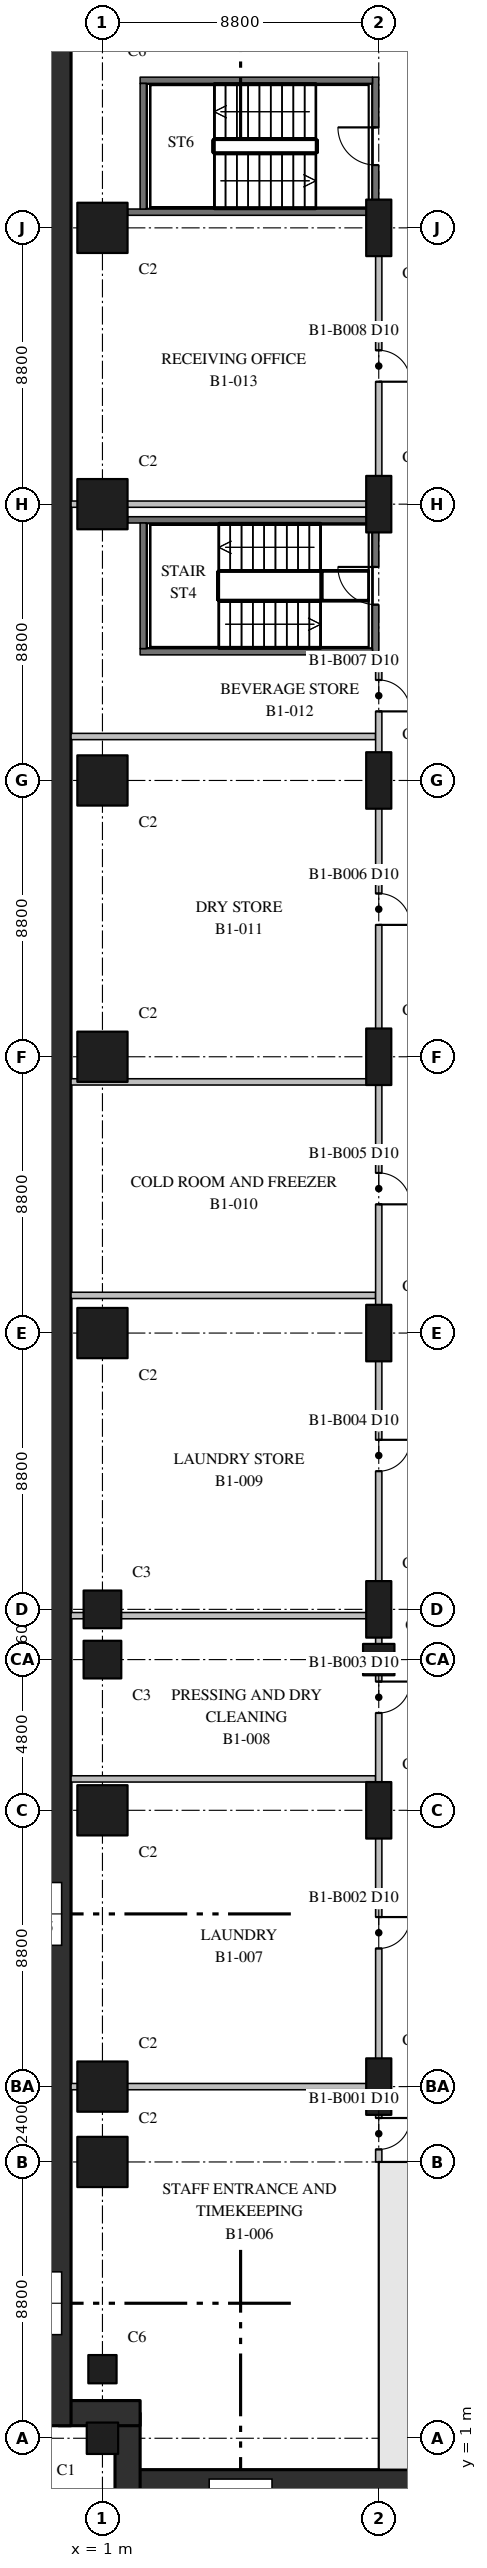
"""IFC4 building model, lengths in metres.
Left out: names, types, materials, properties, quantities, classifications, styles, units other than length and angle.
Written with IfcOpenShell. Run it as: python <this file> out.ifc"""

import sys

from ifc_helpers import new_model, si_unit, direction, frame, frame_2d, origin, origin_2d, place, context, subcontext, project, spatial, rectangle, extrude, element, fill, save


model = new_model("IFC4")
c1 = context("Model", 3, precision=1e-05, world=origin(), true_north=direction((0.0, 1.0)))
c2 = subcontext(c1, "Body", "Model", "MODEL_VIEW")
j1 = project(units=[si_unit("LENGTHUNIT", "METRE"), si_unit("PLANEANGLEUNIT", "RADIAN")], contexts=[c1])
p1 = place(None, origin())
s1 = spatial("IfcSite", under=j1, at=p1, CompositionType="ELEMENT")
p2 = place(p1, origin())
s2 = spatial("IfcBuilding", under=s1, at=p2, CompositionType="ELEMENT")
p3 = place(p2, frame((0.0, 0.0, -7.0)))
s3 = spatial("IfcBuildingStorey", under=s2, at=p3, CompositionType="ELEMENT", Elevation=-7.0)
p4 = place(p3, frame((1.0, 1.0, 0.0), z_axis=(0.0, 0.0, 1.0), x_axis=(1.0, 0.0, 0.0)))
e1 = element("IfcColumn", 1, at=p4, inside=s3, PredefinedType="COLUMN", context=c2, shape_type="SweptSolid", body=[
    extrude(rectangle(XDim=1.0, YDim=1.0, at=origin_2d()), origin(), (0.0, 0.0, 1.0), 7.0),
])
for number, where, z_axis, x_axis in (
    (2, (1.0, 9.8, 0.0), (0.0, 0.0, 1.0), (1.0, 0.0, 0.0)),
    (3, (1.0, 12.2, 0.0), (0.0, 0.0, 1.0), (1.0, 0.0, 0.0)),
    (4, (1.0, 21.0, 0.0), (0.0, 0.0, 1.0), (1.0, 0.0, 0.0)),
):
    element("IfcColumn", number, at=place(p3, frame(where, z_axis=z_axis, x_axis=x_axis)), inside=s3, PredefinedType="COLUMN", context=c2, shape_type="SweptSolid", body=[
        extrude(rectangle(XDim=1.6, YDim=1.6, at=origin_2d()), origin(), (0.0, 0.0, 1.0), 7.0),
    ])
for number, where, z_axis, x_axis in (
    (5, (1.0, 25.8, 0.0), (0.0, 0.0, 1.0), (1.0, 0.0, 0.0)),
    (6, (1.0, 27.4, 0.0), (0.0, 0.0, 1.0), (1.0, 0.0, 0.0)),
):
    element("IfcColumn", number, at=place(p3, frame(where, z_axis=z_axis, x_axis=x_axis)), inside=s3, PredefinedType="COLUMN", context=c2, shape_type="SweptSolid", body=[
        extrude(rectangle(XDim=1.2, YDim=1.2, at=origin_2d()), origin(), (0.0, 0.0, 1.0), 7.0),
    ])
for number, where, z_axis, x_axis in (
    (7, (1.0, 36.2, 0.0), (0.0, 0.0, 1.0), (1.0, 0.0, 0.0)),
    (8, (1.0, 45.0, 0.0), (0.0, 0.0, 1.0), (1.0, 0.0, 0.0)),
    (9, (1.0, 53.8, 0.0), (0.0, 0.0, 1.0), (1.0, 0.0, 0.0)),
    (10, (1.0, 62.6, 0.0), (0.0, 0.0, 1.0), (1.0, 0.0, 0.0)),
    (11, (1.0, 71.4, 0.0), (0.0, 0.0, 1.0), (1.0, 0.0, 0.0)),
):
    element("IfcColumn", number, at=place(p3, frame(where, z_axis=z_axis, x_axis=x_axis)), inside=s3, PredefinedType="COLUMN", context=c2, shape_type="SweptSolid", body=[
        extrude(rectangle(XDim=1.6, YDim=1.6, at=origin_2d()), origin(), (0.0, 0.0, 1.0), 7.0),
    ])
for number, where, z_axis, x_axis in (
    (12, (9.8, 12.2, 0.0), (0.0, 0.0, 1.0), (0.0, 1.0, 0.0)),
    (13, (9.8, 21.0, 0.0), (0.0, 0.0, 1.0), (0.0, 1.0, 0.0)),
):
    element("IfcColumn", number, at=place(p3, frame(where, z_axis=z_axis, x_axis=x_axis)), inside=s3, PredefinedType="COLUMN", context=c2, shape_type="SweptSolid", body=[
        extrude(rectangle(XDim=1.8, YDim=0.8, at=origin_2d()), origin(), (0.0, 0.0, 1.0), 7.0),
    ])
p5 = place(p3, frame((9.8, 25.8, 0.0), z_axis=(0.0, 0.0, 1.0), x_axis=(1.0, 0.0, 0.0)))
e14 = element("IfcColumn", 14, at=p5, inside=s3, PredefinedType="COLUMN", context=c2, shape_type="SweptSolid", body=[
    extrude(rectangle(XDim=1.0, YDim=1.0, at=origin_2d()), origin(), (0.0, 0.0, 1.0), 7.0),
])
for number, where, z_axis, x_axis in (
    (15, (9.8, 27.4, 0.0), (0.0, 0.0, 1.0), (0.0, 1.0, 0.0)),
    (16, (9.8, 36.2, 0.0), (0.0, 0.0, 1.0), (0.0, 1.0, 0.0)),
    (17, (9.8, 45.0, 0.0), (0.0, 0.0, 1.0), (0.0, 1.0, 0.0)),
    (18, (9.8, 53.8, 0.0), (0.0, 0.0, 1.0), (0.0, 1.0, 0.0)),
    (19, (9.8, 62.6, 0.0), (0.0, 0.0, 1.0), (0.0, 1.0, 0.0)),
    (20, (9.8, 71.4, 0.0), (0.0, 0.0, 1.0), (0.0, 1.0, 0.0)),
):
    element("IfcColumn", number, at=place(p3, frame(where, z_axis=z_axis, x_axis=x_axis)), inside=s3, PredefinedType="COLUMN", context=c2, shape_type="SweptSolid", body=[
        extrude(rectangle(XDim=1.8, YDim=0.8, at=origin_2d()), origin(), (0.0, 0.0, 1.0), 7.0),
    ])
p6 = place(p3, frame((1.0, 3.2, 0.0), z_axis=(0.0, 0.0, 1.0), x_axis=(1.0, 0.0, 0.0)))
e21 = element("IfcColumn", 21, at=p6, inside=s3, PredefinedType="COLUMN", context=c2, shape_type="SweptSolid", body=[
    extrude(rectangle(XDim=0.9, YDim=0.9, at=origin_2d()), origin(), (0.0, 0.0, 1.0), 7.0),
])
p7 = place(p3, frame((9.8, 0.6, 0.0), z_axis=(0.0, 0.0, 1.0), x_axis=(1.0, 0.0, 0.0)))
e22 = element("IfcWall", 22, at=p7, inside=s3, PredefinedType="SHEAR", context=c2, shape_type="SweptSolid", body=[
    extrude(rectangle(XDim=35.2, YDim=1.2, at=frame_2d((17.6, 0.0))), origin(), (0.0, 0.0, 1.0), 7.0),
])
p8 = place(p3, frame((10.4, 1.2, 0.0), z_axis=(0.0, 0.0, 1.0), x_axis=(0.0, 1.0, 0.0)))
e23 = element("IfcWall", 23, at=p8, inside=s3, PredefinedType="SHEAR", context=c2, shape_type="SweptSolid", body=[
    extrude(rectangle(XDim=8.6, YDim=1.2, at=frame_2d((4.3, 0.0))), origin(), (0.0, 0.0, 1.0), 7.0),
])
p9 = place(p3, frame((9.8, 9.6, 0.0), z_axis=(0.0, 0.0, 1.0), x_axis=(1.0, 0.0, 0.0)))
e24 = element("IfcWall", 24, at=p9, inside=s3, PredefinedType="SHEAR", context=c2, shape_type="SweptSolid", body=[
    extrude(rectangle(XDim=4.3, YDim=0.4, at=frame_2d((2.15, 0.0))), origin(), (0.0, 0.0, 1.0), 7.0),
])
p10 = place(p9, frame((2.05, 0.0, 0.0)))
e25 = element("IfcOpeningElement", 25, at=p10, cuts=e24, PredefinedType="OPENING", context=c2, shape_type="SweptSolid", body=[
    extrude(rectangle(XDim=1.2, YDim=2.1, at=frame_2d((0.6, 1.05))), frame((0.0, 0.21, 0.0), z_axis=(0.0, -1.0, 0.0), x_axis=(1.0, 0.0, 0.0)), (0.0, 0.0, 1.0), 0.42),
])
p11 = place(p3, frame((79.8, -0.4, 0.0), z_axis=(0.0, 0.0, 1.0), x_axis=(-1.0, 0.0, 0.0)))
e26 = element("IfcWall", 26, at=p11, inside=s3, PredefinedType="SHEAR", context=c2, shape_type="SweptSolid", body=[
    extrude(rectangle(XDim=78.0, YDim=0.8, at=frame_2d((39.0, 0.0))), origin(), (0.0, 0.0, 1.0), 7.0),
])
p12 = place(p3, frame((1.8, -0.8, 0.0), z_axis=(0.0, 0.0, 1.0), x_axis=(0.0, 1.0, 0.0)))
e27 = element("IfcWall", 27, at=p12, inside=s3, PredefinedType="SHEAR", context=c2, shape_type="SweptSolid", body=[
    extrude(rectangle(XDim=2.6, YDim=0.8, at=frame_2d((1.3, 0.0))), origin(), (0.0, 0.0, 1.0), 7.0),
])
p13 = place(p3, frame((2.2, 1.8, 0.0), z_axis=(0.0, 0.0, 1.0), x_axis=(-1.0, 0.0, 0.0)))
e28 = element("IfcWall", 28, at=p13, inside=s3, PredefinedType="SHEAR", context=c2, shape_type="SweptSolid", body=[
    extrude(rectangle(XDim=2.6, YDim=0.8, at=frame_2d((1.3, 0.0))), origin(), (0.0, 0.0, 1.0), 7.0),
])
p14 = place(p3, frame((-0.4, 1.4, 0.0), z_axis=(0.0, 0.0, 1.0), x_axis=(0.0, 1.0, 0.0)))
e29 = element("IfcWall", 29, at=p14, inside=s3, PredefinedType="SHEAR", context=c2, shape_type="SweptSolid", body=[
    extrude(rectangle(XDim=78.0, YDim=0.8, at=frame_2d((39.0, 0.0))), origin(), (0.0, 0.0, 1.0), 7.0),
])
p15 = place(p3, frame((9.7, 57.8, 0.0), z_axis=(0.0, 0.0, 1.0), x_axis=(0.0, 1.0, 0.0)))
e30 = element("IfcWall", 30, at=p15, inside=s3, PredefinedType="SHEAR", context=c2, shape_type="SweptSolid", body=[
    extrude(rectangle(XDim=4.4, YDim=0.2, at=frame_2d((2.2, 0.0))), origin(), (0.0, 0.0, 1.0), 6.55),
])
p16 = place(p15, frame((1.6, 0.0, 0.0)))
e31 = element("IfcOpeningElement", 31, at=p16, cuts=e30, PredefinedType="OPENING", context=c2, shape_type="SweptSolid", body=[
    extrude(rectangle(XDim=1.2, YDim=2.1, at=frame_2d((0.6, 1.05))), frame((0.0, 0.11, 0.0), z_axis=(0.0, -1.0, 0.0), x_axis=(1.0, 0.0, 0.0)), (0.0, 0.0, 1.0), 0.22),
])
p17 = place(p3, frame((1.8, 62.1, 0.0), z_axis=(0.0, 0.0, 1.0), x_axis=(1.0, 0.0, 0.0)))
e32 = element("IfcWall", 32, at=p17, inside=s3, PredefinedType="SHEAR", context=c2, shape_type="SweptSolid", body=[
    extrude(rectangle(XDim=7.8, YDim=0.2, at=frame_2d((3.9, 0.0))), origin(), (0.0, 0.0, 1.0), 6.55),
])
p18 = place(p3, frame((2.2, 57.9, 0.0), z_axis=(0.0, 0.0, 1.0), x_axis=(1.0, 0.0, 0.0)))
e33 = element("IfcWall", 33, at=p18, inside=s3, PredefinedType="SHEAR", context=c2, shape_type="SweptSolid", body=[
    extrude(rectangle(XDim=7.4, YDim=0.2, at=frame_2d((3.7, 0.0))), origin(), (0.0, 0.0, 1.0), 6.55),
])
p19 = place(p3, frame((2.3, 58.0, 0.0), z_axis=(0.0, 0.0, 1.0), x_axis=(0.0, 1.0, 0.0)))
e34 = element("IfcWall", 34, at=p19, inside=s3, PredefinedType="SHEAR", context=c2, shape_type="SweptSolid", body=[
    extrude(rectangle(XDim=4.0, YDim=0.2, at=frame_2d((2.0, 0.0))), origin(), (0.0, 0.0, 1.0), 6.55),
])
p20 = place(p3, frame((9.7, 71.8, 0.0), z_axis=(0.0, 0.0, 1.0), x_axis=(0.0, 1.0, 0.0)))
e35 = element("IfcWall", 35, at=p20, inside=s3, PredefinedType="SHEAR", context=c2, shape_type="SweptSolid", body=[
    extrude(rectangle(XDim=4.4, YDim=0.2, at=frame_2d((2.2, 0.0))), origin(), (0.0, 0.0, 1.0), 6.55),
])
p21 = place(p20, frame((1.6, 0.0, 0.0)))
e36 = element("IfcOpeningElement", 36, at=p21, cuts=e35, PredefinedType="OPENING", context=c2, shape_type="SweptSolid", body=[
    extrude(rectangle(XDim=1.2, YDim=2.1, at=frame_2d((0.6, 1.05))), frame((0.0, 0.11, 0.0), z_axis=(0.0, -1.0, 0.0), x_axis=(1.0, 0.0, 0.0)), (0.0, 0.0, 1.0), 0.22),
])
p22 = place(p3, frame((2.2, 76.1, 0.0), z_axis=(0.0, 0.0, 1.0), x_axis=(1.0, 0.0, 0.0)))
e37 = element("IfcWall", 37, at=p22, inside=s3, PredefinedType="SHEAR", context=c2, shape_type="SweptSolid", body=[
    extrude(rectangle(XDim=7.4, YDim=0.2, at=frame_2d((3.7, 0.0))), origin(), (0.0, 0.0, 1.0), 6.55),
])
p23 = place(p3, frame((1.8, 71.9, 0.0), z_axis=(0.0, 0.0, 1.0), x_axis=(1.0, 0.0, 0.0)))
e38 = element("IfcWall", 38, at=p23, inside=s3, PredefinedType="SHEAR", context=c2, shape_type="SweptSolid", body=[
    extrude(rectangle(XDim=7.8, YDim=0.2, at=frame_2d((3.9, 0.0))), origin(), (0.0, 0.0, 1.0), 6.55),
])
p24 = place(p3, frame((2.3, 72.0, 0.0), z_axis=(0.0, 0.0, 1.0), x_axis=(0.0, 1.0, 0.0)))
e39 = element("IfcWall", 39, at=p24, inside=s3, PredefinedType="SHEAR", context=c2, shape_type="SweptSolid", body=[
    extrude(rectangle(XDim=4.0, YDim=0.2, at=frame_2d((2.0, 0.0))), origin(), (0.0, 0.0, 1.0), 6.55),
])
for number, where, z_axis, x_axis in (
    (40, (0.0, 12.2, 0.0), (0.0, 0.0, 1.0), (1.0, 0.0, 0.0)),
    (41, (0.0, 22.0, 0.0), (0.0, 0.0, 1.0), (1.0, 0.0, 0.0)),
    (42, (0.0, 27.2, 0.0), (0.0, 0.0, 1.0), (1.0, 0.0, 0.0)),
    (43, (0.0, 37.4, 0.0), (0.0, 0.0, 1.0), (1.0, 0.0, 0.0)),
    (44, (0.0, 44.2, 0.0), (0.0, 0.0, 1.0), (1.0, 0.0, 0.0)),
    (45, (0.0, 55.2, 0.0), (0.0, 0.0, 1.0), (1.0, 0.0, 0.0)),
    (46, (0.0, 62.6, 0.0), (0.0, 0.0, 1.0), (1.0, 0.0, 0.0)),
):
    element("IfcWall", number, at=place(p3, frame(where, z_axis=z_axis, x_axis=x_axis)), inside=s3, PredefinedType="PARTITIONING", context=c2, shape_type="SweptSolid", body=[
        extrude(rectangle(XDim=9.7, YDim=0.2, at=frame_2d((4.85, 0.0))), origin(), (0.0, 0.0, 1.0), 6.5),
    ])
p25 = place(p3, frame((9.8, 9.8, 0.0), z_axis=(0.0, 0.0, 1.0), x_axis=(0.0, 1.0, 0.0)))
e47 = element("IfcWall", 47, at=p25, inside=s3, PredefinedType="PARTITIONING", context=c2, shape_type="SweptSolid", body=[
    extrude(rectangle(XDim=48.0, YDim=0.2, at=frame_2d((24.0, 0.0))), origin(), (0.0, 0.0, 1.0), 6.5),
])
p26 = place(p25, frame((0.4, 0.0, 0.0)))
e48 = element("IfcOpeningElement", 48, at=p26, cuts=e47, PredefinedType="OPENING", context=c2, shape_type="SweptSolid", body=[
    extrude(rectangle(XDim=1.0, YDim=2.1, at=frame_2d((0.5, 1.05))), frame((0.0, 0.11, 0.0), z_axis=(0.0, -1.0, 0.0), x_axis=(1.0, 0.0, 0.0)), (0.0, 0.0, 1.0), 0.22),
])
p27 = place(p25, frame((6.8, 0.0, 0.0)))
e49 = element("IfcOpeningElement", 49, at=p27, cuts=e47, PredefinedType="OPENING", context=c2, shape_type="SweptSolid", body=[
    extrude(rectangle(XDim=1.0, YDim=2.1, at=frame_2d((0.5, 1.05))), frame((0.0, 0.11, 0.0), z_axis=(0.0, -1.0, 0.0), x_axis=(1.0, 0.0, 0.0)), (0.0, 0.0, 1.0), 0.22),
])
p28 = place(p25, frame((14.3, 0.0, 0.0)))
e50 = element("IfcOpeningElement", 50, at=p28, cuts=e47, PredefinedType="OPENING", context=c2, shape_type="SweptSolid", body=[
    extrude(rectangle(XDim=1.0, YDim=2.1, at=frame_2d((0.5, 1.05))), frame((0.0, 0.11, 0.0), z_axis=(0.0, -1.0, 0.0), x_axis=(1.0, 0.0, 0.0)), (0.0, 0.0, 1.0), 0.22),
])
p29 = place(p25, frame((22.0, 0.0, 0.0)))
e51 = element("IfcOpeningElement", 51, at=p29, cuts=e47, PredefinedType="OPENING", context=c2, shape_type="SweptSolid", body=[
    extrude(rectangle(XDim=1.0, YDim=2.1, at=frame_2d((0.5, 1.05))), frame((0.0, 0.11, 0.0), z_axis=(0.0, -1.0, 0.0), x_axis=(1.0, 0.0, 0.0)), (0.0, 0.0, 1.0), 0.22),
])
p30 = place(p25, frame((30.5, 0.0, 0.0)))
e52 = element("IfcOpeningElement", 52, at=p30, cuts=e47, PredefinedType="OPENING", context=c2, shape_type="SweptSolid", body=[
    extrude(rectangle(XDim=1.0, YDim=2.1, at=frame_2d((0.5, 1.05))), frame((0.0, 0.11, 0.0), z_axis=(0.0, -1.0, 0.0), x_axis=(1.0, 0.0, 0.0)), (0.0, 0.0, 1.0), 0.22),
])
p31 = place(p25, frame((39.4, 0.0, 0.0)))
e53 = element("IfcOpeningElement", 53, at=p31, cuts=e47, PredefinedType="OPENING", context=c2, shape_type="SweptSolid", body=[
    extrude(rectangle(XDim=1.0, YDim=2.1, at=frame_2d((0.5, 1.05))), frame((0.0, 0.11, 0.0), z_axis=(0.0, -1.0, 0.0), x_axis=(1.0, 0.0, 0.0)), (0.0, 0.0, 1.0), 0.22),
])
p32 = place(p25, frame((46.2, 0.0, 0.0)))
e54 = element("IfcOpeningElement", 54, at=p32, cuts=e47, PredefinedType="OPENING", context=c2, shape_type="SweptSolid", body=[
    extrude(rectangle(XDim=1.0, YDim=2.1, at=frame_2d((0.5, 1.05))), frame((0.0, 0.11, 0.0), z_axis=(0.0, -1.0, 0.0), x_axis=(1.0, 0.0, 0.0)), (0.0, 0.0, 1.0), 0.22),
])
p33 = place(p3, frame((9.8, 62.2, 0.0), z_axis=(0.0, 0.0, 1.0), x_axis=(0.0, 1.0, 0.0)))
e55 = element("IfcWall", 55, at=p33, inside=s3, PredefinedType="PARTITIONING", context=c2, shape_type="SweptSolid", body=[
    extrude(rectangle(XDim=9.2, YDim=0.2, at=frame_2d((4.6, 0.0))), origin(), (0.0, 0.0, 1.0), 6.5),
])
p34 = place(p33, frame((4.3, 0.0, 0.0)))
e56 = element("IfcOpeningElement", 56, at=p34, cuts=e55, PredefinedType="OPENING", context=c2, shape_type="SweptSolid", body=[
    extrude(rectangle(XDim=1.0, YDim=2.1, at=frame_2d((0.5, 1.05))), frame((0.0, 0.11, 0.0), z_axis=(0.0, -1.0, 0.0), x_axis=(1.0, 0.0, 0.0)), (0.0, 0.0, 1.0), 0.22),
])
p35 = place(p16, origin())
e57 = element("IfcDoor", 57, at=p35, inside=s3, OperationType="SINGLE_SWING_RIGHT", PredefinedType="DOOR", context=c2, shape_type="SweptSolid", body=[
    extrude(rectangle(XDim=1.2, YDim=2.1, at=frame_2d((0.6, 1.05))), frame((0.0, 0.025, 0.0), z_axis=(0.0, -1.0, 0.0), x_axis=(1.0, 0.0, 0.0)), (0.0, 0.0, 1.0), 0.05),
])
fill(e31, e57)
p36 = place(p21, origin())
e58 = element("IfcDoor", 58, at=p36, inside=s3, OperationType="SINGLE_SWING_RIGHT", PredefinedType="DOOR", context=c2, shape_type="SweptSolid", body=[
    extrude(rectangle(XDim=1.2, YDim=2.1, at=frame_2d((0.6, 1.05))), frame((0.0, 0.025, 0.0), z_axis=(0.0, -1.0, 0.0), x_axis=(1.0, 0.0, 0.0)), (0.0, 0.0, 1.0), 0.05),
])
fill(e36, e58)
p37 = place(p26, frame((1.0, 0.0, 0.0), z_axis=(0.0, 0.0, 1.0), x_axis=(-1.0, 0.0, 0.0)))
e59 = element("IfcDoor", 59, at=p37, inside=s3, OperationType="SINGLE_SWING_RIGHT", PredefinedType="DOOR", context=c2, shape_type="SweptSolid", body=[
    extrude(rectangle(XDim=1.0, YDim=2.1, at=frame_2d((0.5, 1.05))), frame((0.0, 0.025, 0.0), z_axis=(0.0, -1.0, 0.0), x_axis=(1.0, 0.0, 0.0)), (0.0, 0.0, 1.0), 0.05),
])
fill(e48, e59)
p38 = place(p27, frame((1.0, 0.0, 0.0), z_axis=(0.0, 0.0, 1.0), x_axis=(-1.0, 0.0, 0.0)))
e60 = element("IfcDoor", 60, at=p38, inside=s3, OperationType="SINGLE_SWING_RIGHT", PredefinedType="DOOR", context=c2, shape_type="SweptSolid", body=[
    extrude(rectangle(XDim=1.0, YDim=2.1, at=frame_2d((0.5, 1.05))), frame((0.0, 0.025, 0.0), z_axis=(0.0, -1.0, 0.0), x_axis=(1.0, 0.0, 0.0)), (0.0, 0.0, 1.0), 0.05),
])
fill(e49, e60)
p39 = place(p28, frame((1.0, 0.0, 0.0), z_axis=(0.0, 0.0, 1.0), x_axis=(-1.0, 0.0, 0.0)))
e61 = element("IfcDoor", 61, at=p39, inside=s3, OperationType="SINGLE_SWING_RIGHT", PredefinedType="DOOR", context=c2, shape_type="SweptSolid", body=[
    extrude(rectangle(XDim=1.0, YDim=2.1, at=frame_2d((0.5, 1.05))), frame((0.0, 0.025, 0.0), z_axis=(0.0, -1.0, 0.0), x_axis=(1.0, 0.0, 0.0)), (0.0, 0.0, 1.0), 0.05),
])
fill(e50, e61)
p40 = place(p29, frame((1.0, 0.0, 0.0), z_axis=(0.0, 0.0, 1.0), x_axis=(-1.0, 0.0, 0.0)))
e62 = element("IfcDoor", 62, at=p40, inside=s3, OperationType="SINGLE_SWING_RIGHT", PredefinedType="DOOR", context=c2, shape_type="SweptSolid", body=[
    extrude(rectangle(XDim=1.0, YDim=2.1, at=frame_2d((0.5, 1.05))), frame((0.0, 0.025, 0.0), z_axis=(0.0, -1.0, 0.0), x_axis=(1.0, 0.0, 0.0)), (0.0, 0.0, 1.0), 0.05),
])
fill(e51, e62)
p41 = place(p30, frame((1.0, 0.0, 0.0), z_axis=(0.0, 0.0, 1.0), x_axis=(-1.0, 0.0, 0.0)))
e63 = element("IfcDoor", 63, at=p41, inside=s3, OperationType="SINGLE_SWING_LEFT", PredefinedType="DOOR", context=c2, shape_type="SweptSolid", body=[
    extrude(rectangle(XDim=1.0, YDim=2.1, at=frame_2d((0.5, 1.05))), frame((0.0, 0.025, 0.0), z_axis=(0.0, -1.0, 0.0), x_axis=(1.0, 0.0, 0.0)), (0.0, 0.0, 1.0), 0.05),
])
fill(e52, e63)
p42 = place(p31, frame((1.0, 0.0, 0.0), z_axis=(0.0, 0.0, 1.0), x_axis=(-1.0, 0.0, 0.0)))
e64 = element("IfcDoor", 64, at=p42, inside=s3, OperationType="SINGLE_SWING_LEFT", PredefinedType="DOOR", context=c2, shape_type="SweptSolid", body=[
    extrude(rectangle(XDim=1.0, YDim=2.1, at=frame_2d((0.5, 1.05))), frame((0.0, 0.025, 0.0), z_axis=(0.0, -1.0, 0.0), x_axis=(1.0, 0.0, 0.0)), (0.0, 0.0, 1.0), 0.05),
])
fill(e53, e64)
p43 = place(p32, frame((1.0, 0.0, 0.0), z_axis=(0.0, 0.0, 1.0), x_axis=(-1.0, 0.0, 0.0)))
e65 = element("IfcDoor", 65, at=p43, inside=s3, OperationType="SINGLE_SWING_LEFT", PredefinedType="DOOR", context=c2, shape_type="SweptSolid", body=[
    extrude(rectangle(XDim=1.0, YDim=2.1, at=frame_2d((0.5, 1.05))), frame((0.0, 0.025, 0.0), z_axis=(0.0, -1.0, 0.0), x_axis=(1.0, 0.0, 0.0)), (0.0, 0.0, 1.0), 0.05),
])
fill(e54, e65)
p44 = place(p34, frame((1.0, 0.0, 0.0), z_axis=(0.0, 0.0, 1.0), x_axis=(-1.0, 0.0, 0.0)))
e66 = element("IfcDoor", 66, at=p44, inside=s3, OperationType="SINGLE_SWING_LEFT", PredefinedType="DOOR", context=c2, shape_type="SweptSolid", body=[
    extrude(rectangle(XDim=1.0, YDim=2.1, at=frame_2d((0.5, 1.05))), frame((0.0, 0.025, 0.0), z_axis=(0.0, -1.0, 0.0), x_axis=(1.0, 0.0, 0.0)), (0.0, 0.0, 1.0), 0.05),
])
fill(e56, e66)
save(model, sys.argv[1])
